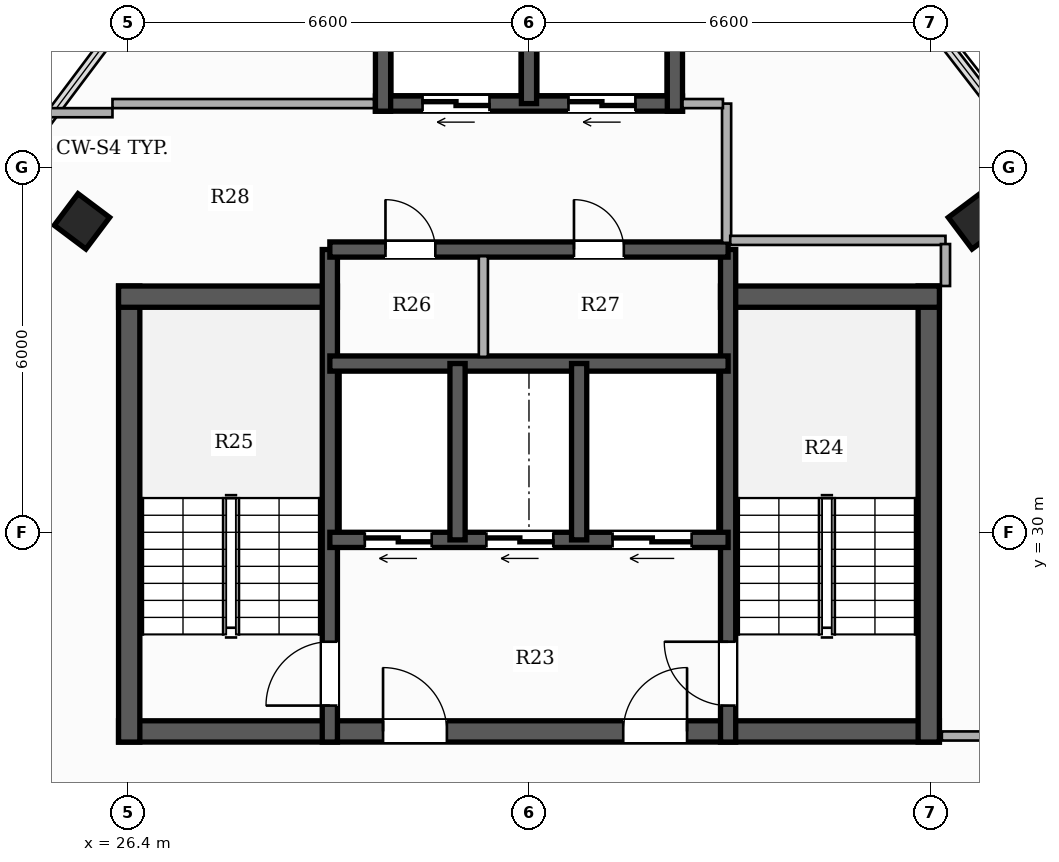
"""IFC4 building model, lengths in metres.
Left out: names, types, materials, properties, quantities, classifications, styles, units other than length and angle.
Written with IfcOpenShell. Run it as: python <this file> out.ifc"""

import sys

from ifc_helpers import new_model, si_unit, direction, frame, frame_2d, origin, origin_2d, place, context, subcontext, project, spatial, rectangle, hollow_rectangle, extrude, element, fill, save


model = new_model("IFC4")
c1 = context("Model", 3, precision=1e-05, world=origin(), true_north=direction((0.0, 1.0)))
c2 = subcontext(c1, "Body", "Model", "MODEL_VIEW")
j1 = project(units=[si_unit("LENGTHUNIT", "METRE"), si_unit("PLANEANGLEUNIT", "RADIAN")], contexts=[c1])
p1 = place(None, origin())
s1 = spatial("IfcSite", under=j1, at=p1, CompositionType="ELEMENT")
p2 = place(p1, origin())
s2 = spatial("IfcBuilding", under=s1, at=p2, CompositionType="ELEMENT")
p3 = place(p2, frame((0.0, 0.0, 256.85)))
s3 = spatial("IfcBuildingStorey", under=s2, at=p3, CompositionType="ELEMENT", Elevation=256.85)
p4 = place(p3, frame((26.25, 26.725, 0.0), z_axis=(0.0, 0.0, 1.0), x_axis=(1.0, 0.0, 0.0)))
e1 = element("IfcWall", 1, at=p4, inside=s3, PredefinedType="SHEAR", context=c2, shape_type="SweptSolid", body=[
    extrude(rectangle(XDim=13.5, YDim=0.35, at=frame_2d((6.75, 0.0))), origin(), (0.0, 0.0, 1.0), 3.3),
])
p5 = place(p4, frame((4.35, 0.0, 0.0)))
e2 = element("IfcOpeningElement", 2, at=p5, cuts=e1, PredefinedType="OPENING", context=c2, shape_type="SweptSolid", body=[
    extrude(rectangle(XDim=1.05, YDim=2.15, at=frame_2d((0.525, 1.075))), frame((0.0, 0.185, 0.0), z_axis=(0.0, -1.0, 0.0), x_axis=(1.0, 0.0, 0.0)), (0.0, 0.0, 1.0), 0.37),
])
p6 = place(p4, frame((8.3, 0.0, 0.0)))
e3 = element("IfcOpeningElement", 3, at=p6, cuts=e1, PredefinedType="OPENING", context=c2, shape_type="SweptSolid", body=[
    extrude(rectangle(XDim=1.05, YDim=2.15, at=frame_2d((0.525, 1.075))), frame((0.0, 0.185, 0.0), z_axis=(0.0, -1.0, 0.0), x_axis=(1.0, 0.0, 0.0)), (0.0, 0.0, 1.0), 0.37),
])
p7 = place(p3, frame((26.425, 26.55, 0.0), z_axis=(0.0, 0.0, 1.0), x_axis=(0.0, 1.0, 0.0)))
e4 = element("IfcWall", 4, at=p7, inside=s3, PredefinedType="SHEAR", context=c2, shape_type="SweptSolid", body=[
    extrude(rectangle(XDim=7.5, YDim=0.35, at=frame_2d((3.75, 0.0))), origin(), (0.0, 0.0, 1.0), 3.3),
])
p8 = place(p3, frame((26.25, 33.875, 0.0), z_axis=(0.0, 0.0, 1.0), x_axis=(1.0, 0.0, 0.0)))
e5 = element("IfcWall", 5, at=p8, inside=s3, PredefinedType="SHEAR", context=c2, shape_type="SweptSolid", body=[
    extrude(rectangle(XDim=3.6, YDim=0.35, at=frame_2d((1.8, 0.0))), origin(), (0.0, 0.0, 1.0), 3.3),
])
p9 = place(p3, frame((39.575, 26.55, 0.0), z_axis=(0.0, 0.0, 1.0), x_axis=(0.0, 1.0, 0.0)))
e6 = element("IfcWall", 6, at=p9, inside=s3, PredefinedType="SHEAR", context=c2, shape_type="SweptSolid", body=[
    extrude(rectangle(XDim=7.5, YDim=0.35, at=frame_2d((3.75, 0.0))), origin(), (0.0, 0.0, 1.0), 3.3),
])
p10 = place(p3, frame((36.15, 33.875, 0.0), z_axis=(0.0, 0.0, 1.0), x_axis=(1.0, 0.0, 0.0)))
e7 = element("IfcWall", 7, at=p10, inside=s3, PredefinedType="SHEAR", context=c2, shape_type="SweptSolid", body=[
    extrude(rectangle(XDim=3.6, YDim=0.35, at=frame_2d((1.8, 0.0))), origin(), (0.0, 0.0, 1.0), 3.3),
])
p11 = place(p3, frame((29.725, 26.55, 0.0), z_axis=(0.0, 0.0, 1.0), x_axis=(0.0, 1.0, 0.0)))
e8 = element("IfcWall", 8, at=p11, inside=s3, PredefinedType="SHEAR", context=c2, shape_type="SweptSolid", body=[
    extrude(rectangle(XDim=8.1, YDim=0.25, at=frame_2d((4.05, 0.0))), origin(), (0.0, 0.0, 1.0), 3.3),
])
p12 = place(p11, frame((0.6, 0.0, 0.0)))
e9 = element("IfcOpeningElement", 9, at=p12, cuts=e8, PredefinedType="OPENING", context=c2, shape_type="SweptSolid", body=[
    extrude(rectangle(XDim=1.05, YDim=2.15, at=frame_2d((0.525, 1.075))), frame((0.0, 0.135, 0.0), z_axis=(0.0, -1.0, 0.0), x_axis=(1.0, 0.0, 0.0)), (0.0, 0.0, 1.0), 0.27),
])
p13 = place(p3, frame((36.275, 26.55, 0.0), z_axis=(0.0, 0.0, 1.0), x_axis=(0.0, 1.0, 0.0)))
e10 = element("IfcWall", 10, at=p13, inside=s3, PredefinedType="SHEAR", context=c2, shape_type="SweptSolid", body=[
    extrude(rectangle(XDim=8.1, YDim=0.25, at=frame_2d((4.05, 0.0))), origin(), (0.0, 0.0, 1.0), 3.3),
])
p14 = place(p13, frame((0.6, 0.0, 0.0)))
e11 = element("IfcOpeningElement", 11, at=p14, cuts=e10, PredefinedType="OPENING", context=c2, shape_type="SweptSolid", body=[
    extrude(rectangle(XDim=1.05, YDim=2.15, at=frame_2d((0.525, 1.075))), frame((0.0, 0.135, 0.0), z_axis=(0.0, -1.0, 0.0), x_axis=(1.0, 0.0, 0.0)), (0.0, 0.0, 1.0), 0.27),
])
p15 = place(p3, frame((36.275, 29.875, 0.0), z_axis=(0.0, 0.0, 1.0), x_axis=(-1.0, 0.0, 0.0)))
e12 = element("IfcWall", 12, at=p15, inside=s3, PredefinedType="SHEAR", context=c2, shape_type="SweptSolid", body=[
    extrude(rectangle(XDim=6.55, YDim=0.25, at=frame_2d((3.275, 0.0))), origin(), (0.0, 0.0, 1.0), 3.3),
])
p16 = place(p15, frame((4.875, 0.0, 0.0)))
e13 = element("IfcOpeningElement", 13, at=p16, cuts=e12, PredefinedType="OPENING", context=c2, shape_type="SweptSolid", body=[
    extrude(rectangle(XDim=1.1, YDim=2.2, at=frame_2d((0.55, 1.1))), frame((0.0, 0.135, 0.0), z_axis=(0.0, -1.0, 0.0), x_axis=(1.0, 0.0, 0.0)), (0.0, 0.0, 1.0), 0.27),
])
p17 = place(p15, frame((2.875, 0.0, 0.0)))
e14 = element("IfcOpeningElement", 14, at=p17, cuts=e12, PredefinedType="OPENING", context=c2, shape_type="SweptSolid", body=[
    extrude(rectangle(XDim=1.1, YDim=2.2, at=frame_2d((0.55, 1.1))), frame((0.0, 0.135, 0.0), z_axis=(0.0, -1.0, 0.0), x_axis=(1.0, 0.0, 0.0)), (0.0, 0.0, 1.0), 0.27),
])
p18 = place(p15, frame((0.6, 0.0, 0.0)))
e15 = element("IfcOpeningElement", 15, at=p18, cuts=e12, PredefinedType="OPENING", context=c2, shape_type="SweptSolid", body=[
    extrude(rectangle(XDim=1.3, YDim=2.2, at=frame_2d((0.65, 1.1))), frame((0.0, 0.135, 0.0), z_axis=(0.0, -1.0, 0.0), x_axis=(1.0, 0.0, 0.0)), (0.0, 0.0, 1.0), 0.27),
])
p19 = place(p3, frame((29.725, 32.775, 0.0), z_axis=(0.0, 0.0, 1.0), x_axis=(1.0, 0.0, 0.0)))
e16 = element("IfcWall", 16, at=p19, inside=s3, PredefinedType="SHEAR", context=c2, shape_type="SweptSolid", body=[
    extrude(rectangle(XDim=6.55, YDim=0.25, at=frame_2d((3.275, 0.0))), origin(), (0.0, 0.0, 1.0), 3.3),
])
for number, where, z_axis, x_axis in (
    (17, (31.825, 29.875, 0.0), (0.0, 0.0, 1.0), (0.0, 1.0, 0.0)),
    (18, (33.825, 29.875, 0.0), (0.0, 0.0, 1.0), (0.0, 1.0, 0.0)),
):
    element("IfcWall", number, at=place(p3, frame(where, z_axis=z_axis, x_axis=x_axis)), inside=s3, PredefinedType="SHEAR", context=c2, shape_type="SweptSolid", body=[
        extrude(rectangle(XDim=2.9, YDim=0.25, at=frame_2d((1.45, 0.0))), origin(), (0.0, 0.0, 1.0), 3.3),
    ])
p20 = place(p3, frame((29.725, 34.65, 0.0), z_axis=(0.0, 0.0, 1.0), x_axis=(1.0, 0.0, 0.0)))
e19 = element("IfcWall", 19, at=p20, inside=s3, PredefinedType="SHEAR", context=c2, shape_type="SweptSolid", body=[
    extrude(rectangle(XDim=6.55, YDim=0.25, at=frame_2d((3.275, 0.0))), origin(), (0.0, 0.0, 1.0), 3.3),
])
p21 = place(p20, frame((0.915, 0.0, 0.0)))
e20 = element("IfcOpeningElement", 20, at=p21, cuts=e19, PredefinedType="OPENING", context=c2, shape_type="SweptSolid", body=[
    extrude(rectangle(XDim=0.82, YDim=2.1, at=frame_2d((0.41, 1.05))), frame((0.0, 0.135, 0.0), z_axis=(0.0, -1.0, 0.0), x_axis=(1.0, 0.0, 0.0)), (0.0, 0.0, 1.0), 0.27),
])
p22 = place(p20, frame((4.015, 0.0, 0.0)))
e21 = element("IfcOpeningElement", 21, at=p22, cuts=e19, PredefinedType="OPENING", context=c2, shape_type="SweptSolid", body=[
    extrude(rectangle(XDim=0.82, YDim=2.1, at=frame_2d((0.41, 1.05))), frame((0.0, 0.135, 0.0), z_axis=(0.0, -1.0, 0.0), x_axis=(1.0, 0.0, 0.0)), (0.0, 0.0, 1.0), 0.27),
])
p23 = place(p3, frame((35.525, 37.05, 0.0), z_axis=(0.0, 0.0, 1.0), x_axis=(-1.0, 0.0, 0.0)))
e22 = element("IfcWall", 22, at=p23, inside=s3, PredefinedType="SHEAR", context=c2, shape_type="SweptSolid", body=[
    extrude(rectangle(XDim=5.05, YDim=0.25, at=frame_2d((2.525, 0.0))), origin(), (0.0, 0.0, 1.0), 3.3),
])
p24 = place(p23, frame((3.175, 0.0, 0.0)))
e23 = element("IfcOpeningElement", 23, at=p24, cuts=e22, PredefinedType="OPENING", context=c2, shape_type="SweptSolid", body=[
    extrude(rectangle(XDim=1.1, YDim=2.2, at=frame_2d((0.55, 1.1))), frame((0.0, 0.135, 0.0), z_axis=(0.0, -1.0, 0.0), x_axis=(1.0, 0.0, 0.0)), (0.0, 0.0, 1.0), 0.27),
])
p25 = place(p23, frame((0.775, 0.0, 0.0)))
e24 = element("IfcOpeningElement", 24, at=p25, cuts=e22, PredefinedType="OPENING", context=c2, shape_type="SweptSolid", body=[
    extrude(rectangle(XDim=1.1, YDim=2.2, at=frame_2d((0.55, 1.1))), frame((0.0, 0.135, 0.0), z_axis=(0.0, -1.0, 0.0), x_axis=(1.0, 0.0, 0.0)), (0.0, 0.0, 1.0), 0.27),
])
for number, where, z_axis, x_axis in (
    (25, (30.6, 36.925, 0.0), (0.0, 0.0, 1.0), (0.0, 1.0, 0.0)),
    (26, (35.4, 36.925, 0.0), (0.0, 0.0, 1.0), (0.0, 1.0, 0.0)),
):
    element("IfcWall", number, at=place(p3, frame(where, z_axis=z_axis, x_axis=x_axis)), inside=s3, PredefinedType="SHEAR", context=c2, shape_type="SweptSolid", body=[
        extrude(rectangle(XDim=2.8, YDim=0.25, at=frame_2d((1.4, 0.0))), origin(), (0.0, 0.0, 1.0), 3.3),
    ])
p26 = place(p3, frame((33.0, 37.05, 0.0), z_axis=(0.0, 0.0, 1.0), x_axis=(0.0, 1.0, 0.0)))
e27 = element("IfcWall", 27, at=p26, inside=s3, PredefinedType="SHEAR", context=c2, shape_type="SweptSolid", body=[
    extrude(rectangle(XDim=2.55, YDim=0.25, at=frame_2d((1.275, 0.0))), origin(), (0.0, 0.0, 1.0), 3.3),
])
for number, where, z_axis, x_axis in (
    (28, (25.648, 35.113, 0.0), (0.0, 0.0, 1.0), (0.6, 0.8, 0.0)),
    (29, (40.352, 35.113, 0.0), (0.0, 0.0, 1.0), (-0.6, 0.8, 0.0)),
):
    element("IfcColumn", number, at=place(p3, frame(where, z_axis=z_axis, x_axis=x_axis)), inside=s3, PredefinedType="COLUMN", context=c2, shape_type="SweptSolid", body=[
        extrude(hollow_rectangle(XDim=0.65, YDim=0.65, WallThickness=0.022, at=origin_2d()), origin(), (0.0, 0.0, 1.0), 3.3),
    ])
p27 = place(p3, frame((36.25, 34.76, 0.0), z_axis=(0.0, 0.0, 1.0), x_axis=(0.0, 1.0, 0.0)))
e30 = element("IfcWall", 30, at=p27, inside=s3, PredefinedType="PARTITIONING", context=c2, shape_type="SweptSolid", body=[
    extrude(rectangle(XDim=2.29, YDim=0.15, at=frame_2d((1.145, 0.0))), origin(), (0.0, 0.0, 1.0), 2.425),
])
p28 = place(p3, frame((35.525, 37.05, 0.0), z_axis=(0.0, 0.0, 1.0), x_axis=(1.0, 0.0, 0.0)))
e31 = element("IfcWall", 31, at=p28, inside=s3, PredefinedType="PARTITIONING", context=c2, shape_type="SweptSolid", body=[
    extrude(rectangle(XDim=0.665, YDim=0.15, at=frame_2d((0.333, 0.0))), origin(), (0.0, 0.0, 1.0), 2.425),
])
p29 = place(p3, frame((32.25, 32.885, 0.0), z_axis=(0.0, 0.0, 1.0), x_axis=(0.0, 1.0, 0.0)))
e32 = element("IfcWall", 32, at=p29, inside=s3, PredefinedType="PARTITIONING", context=c2, shape_type="SweptSolid", body=[
    extrude(rectangle(XDim=1.655, YDim=0.15, at=frame_2d((0.828, 0.0))), origin(), (0.0, 0.0, 1.0), 3.06),
])
p30 = place(p3, frame((25.058, 36.9, 0.0), z_axis=(0.0, 0.0, 1.0), x_axis=(1.0, 0.0, 0.0)))
e33 = element("IfcWall", 33, at=p30, inside=s3, PredefinedType="PARTITIONING", context=c2, shape_type="SweptSolid", body=[
    extrude(rectangle(XDim=1.092, YDim=0.15, at=frame_2d((0.546, 0.0))), origin(), (0.0, 0.0, 1.0), 3.06),
])
p31 = place(p3, frame((39.79, 26.65, 0.0), z_axis=(0.0, 0.0, 1.0), x_axis=(1.0, 0.0, 0.0)))
e34 = element("IfcWall", 34, at=p31, inside=s3, PredefinedType="PARTITIONING", context=c2, shape_type="SweptSolid", body=[
    extrude(rectangle(XDim=2.46, YDim=0.15, at=frame_2d((1.23, 0.0))), origin(), (0.0, 0.0, 1.0), 2.565),
])
p32 = place(p3, frame((26.15, 37.05, 0.0), z_axis=(0.0, 0.0, 1.0), x_axis=(1.0, 0.0, 0.0)))
e35 = element("IfcWall", 35, at=p32, inside=s3, PredefinedType="PARTITIONING", context=c2, shape_type="SweptSolid", body=[
    extrude(rectangle(XDim=4.3, YDim=0.15, at=frame_2d((2.15, 0.0))), origin(), (0.0, 0.0, 1.0), 2.425),
])
p33 = place(p3, frame((36.31, 34.8, 0.0), z_axis=(0.0, 0.0, 1.0), x_axis=(1.0, 0.0, 0.0)))
e36 = element("IfcWall", 36, at=p33, inside=s3, PredefinedType="PARTITIONING", context=c2, shape_type="SweptSolid", body=[
    extrude(rectangle(XDim=3.54, YDim=0.15, at=frame_2d((1.77, 0.0))), origin(), (0.0, 0.0, 1.0), 2.425),
])
p34 = place(p3, frame((39.85, 34.74, 0.0), z_axis=(0.0, 0.0, 1.0), x_axis=(0.0, -1.0, 0.0)))
e37 = element("IfcWall", 37, at=p34, inside=s3, PredefinedType="PARTITIONING", context=c2, shape_type="SweptSolid", body=[
    extrude(rectangle(XDim=0.69, YDim=0.15, at=frame_2d((0.345, 0.0))), origin(), (0.0, 0.0, 1.0), 2.773),
])
p35 = place(p12, origin())
e38 = element("IfcDoor", 38, at=p35, inside=s3, OperationType="SINGLE_SWING_LEFT", PredefinedType="DOOR", context=c2, shape_type="SweptSolid", body=[
    extrude(rectangle(XDim=1.05, YDim=2.15, at=frame_2d((0.525, 1.075))), frame((0.0, 0.025, 0.0), z_axis=(0.0, -1.0, 0.0), x_axis=(1.0, 0.0, 0.0)), (0.0, 0.0, 1.0), 0.05),
])
fill(e9, e38)
p36 = place(p14, origin())
e39 = element("IfcDoor", 39, at=p36, inside=s3, OperationType="SINGLE_SWING_RIGHT", PredefinedType="DOOR", context=c2, shape_type="SweptSolid", body=[
    extrude(rectangle(XDim=1.05, YDim=2.15, at=frame_2d((0.525, 1.075))), frame((0.0, 0.025, 0.0), z_axis=(0.0, -1.0, 0.0), x_axis=(1.0, 0.0, 0.0)), (0.0, 0.0, 1.0), 0.05),
])
fill(e11, e39)
p37 = place(p5, origin())
e40 = element("IfcDoor", 40, at=p37, inside=s3, OperationType="SINGLE_SWING_LEFT", PredefinedType="DOOR", context=c2, shape_type="SweptSolid", body=[
    extrude(rectangle(XDim=1.05, YDim=2.15, at=frame_2d((0.525, 1.075))), frame((0.0, 0.025, 0.0), z_axis=(0.0, -1.0, 0.0), x_axis=(1.0, 0.0, 0.0)), (0.0, 0.0, 1.0), 0.05),
])
fill(e2, e40)
p38 = place(p6, origin())
e41 = element("IfcDoor", 41, at=p38, inside=s3, OperationType="SINGLE_SWING_RIGHT", PredefinedType="DOOR", context=c2, shape_type="SweptSolid", body=[
    extrude(rectangle(XDim=1.05, YDim=2.15, at=frame_2d((0.525, 1.075))), frame((0.0, 0.025, 0.0), z_axis=(0.0, -1.0, 0.0), x_axis=(1.0, 0.0, 0.0)), (0.0, 0.0, 1.0), 0.05),
])
fill(e3, e41)
p39 = place(p16, origin())
e42 = element("IfcDoor", 42, at=p39, inside=s3, OperationType="DOUBLE_DOOR_SLIDING", PredefinedType="DOOR", context=c2, shape_type="SweptSolid", body=[
    extrude(rectangle(XDim=1.1, YDim=2.2, at=frame_2d((0.55, 1.1))), frame((0.0, 0.025, 0.0), z_axis=(0.0, -1.0, 0.0), x_axis=(1.0, 0.0, 0.0)), (0.0, 0.0, 1.0), 0.05),
])
fill(e13, e42)
p40 = place(p17, origin())
e43 = element("IfcDoor", 43, at=p40, inside=s3, OperationType="DOUBLE_DOOR_SLIDING", PredefinedType="DOOR", context=c2, shape_type="SweptSolid", body=[
    extrude(rectangle(XDim=1.1, YDim=2.2, at=frame_2d((0.55, 1.1))), frame((0.0, 0.025, 0.0), z_axis=(0.0, -1.0, 0.0), x_axis=(1.0, 0.0, 0.0)), (0.0, 0.0, 1.0), 0.05),
])
fill(e14, e43)
p41 = place(p18, origin())
e44 = element("IfcDoor", 44, at=p41, inside=s3, OperationType="DOUBLE_DOOR_SLIDING", PredefinedType="DOOR", context=c2, shape_type="SweptSolid", body=[
    extrude(rectangle(XDim=1.3, YDim=2.2, at=frame_2d((0.65, 1.1))), frame((0.0, 0.025, 0.0), z_axis=(0.0, -1.0, 0.0), x_axis=(1.0, 0.0, 0.0)), (0.0, 0.0, 1.0), 0.05),
])
fill(e15, e44)
p42 = place(p24, origin())
e45 = element("IfcDoor", 45, at=p42, inside=s3, OperationType="DOUBLE_DOOR_SLIDING", PredefinedType="DOOR", context=c2, shape_type="SweptSolid", body=[
    extrude(rectangle(XDim=1.1, YDim=2.2, at=frame_2d((0.55, 1.1))), frame((0.0, 0.025, 0.0), z_axis=(0.0, -1.0, 0.0), x_axis=(1.0, 0.0, 0.0)), (0.0, 0.0, 1.0), 0.05),
])
fill(e23, e45)
p43 = place(p25, origin())
e46 = element("IfcDoor", 46, at=p43, inside=s3, OperationType="DOUBLE_DOOR_SLIDING", PredefinedType="DOOR", context=c2, shape_type="SweptSolid", body=[
    extrude(rectangle(XDim=1.1, YDim=2.2, at=frame_2d((0.55, 1.1))), frame((0.0, 0.025, 0.0), z_axis=(0.0, -1.0, 0.0), x_axis=(1.0, 0.0, 0.0)), (0.0, 0.0, 1.0), 0.05),
])
fill(e24, e46)
p44 = place(p21, origin())
e47 = element("IfcDoor", 47, at=p44, inside=s3, OperationType="SINGLE_SWING_LEFT", PredefinedType="DOOR", context=c2, shape_type="SweptSolid", body=[
    extrude(rectangle(XDim=0.82, YDim=2.1, at=frame_2d((0.41, 1.05))), frame((0.0, 0.025, 0.0), z_axis=(0.0, -1.0, 0.0), x_axis=(1.0, 0.0, 0.0)), (0.0, 0.0, 1.0), 0.05),
])
fill(e20, e47)
p45 = place(p22, origin())
e48 = element("IfcDoor", 48, at=p45, inside=s3, OperationType="SINGLE_SWING_LEFT", PredefinedType="DOOR", context=c2, shape_type="SweptSolid", body=[
    extrude(rectangle(XDim=0.82, YDim=2.1, at=frame_2d((0.41, 1.05))), frame((0.0, 0.025, 0.0), z_axis=(0.0, -1.0, 0.0), x_axis=(1.0, 0.0, 0.0)), (0.0, 0.0, 1.0), 0.05),
])
fill(e21, e48)
save(model, sys.argv[1])
